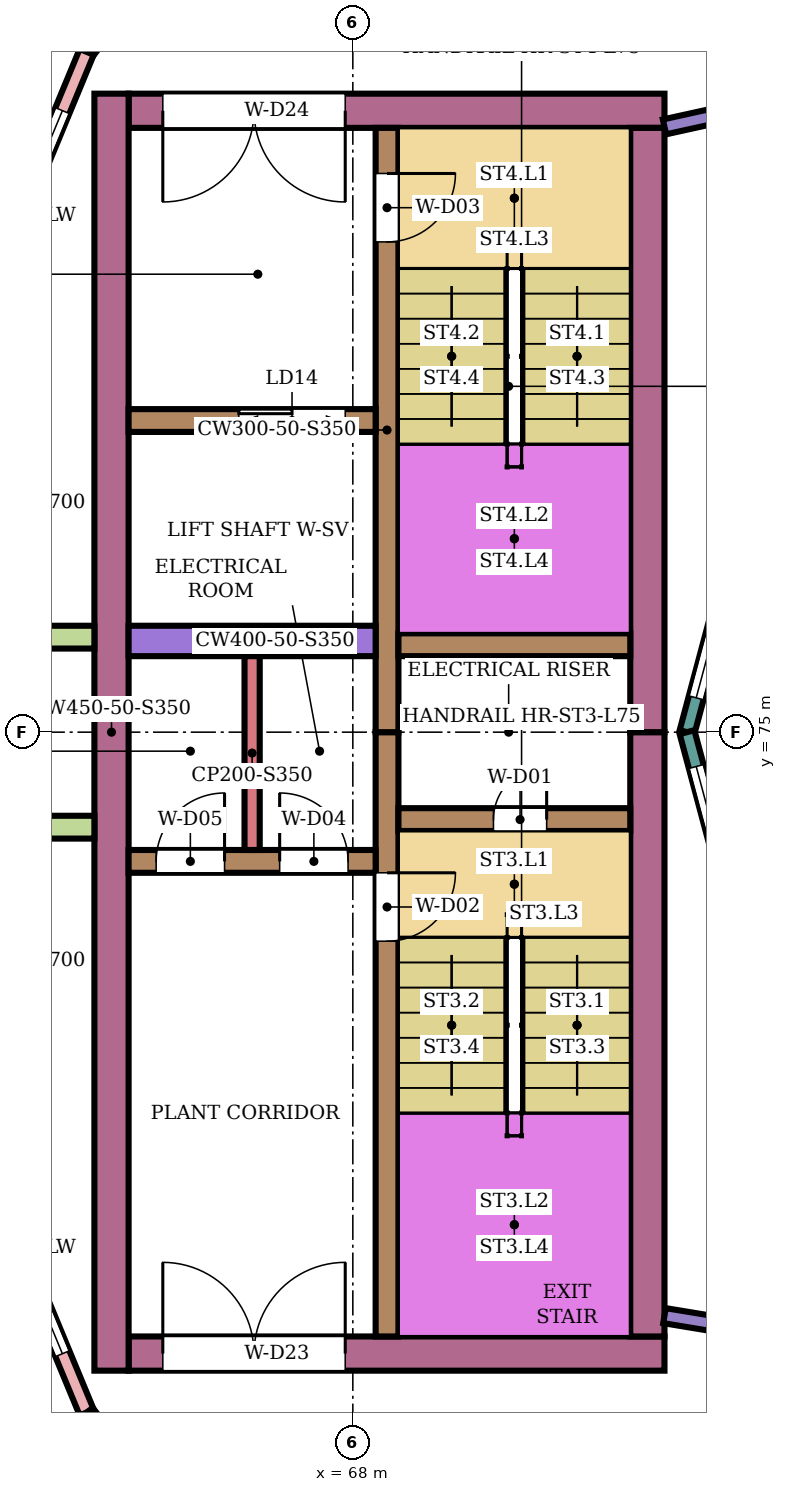
"""IFC4 building model, lengths in metres.
Left out: names, types, materials, properties, quantities, classifications, styles, units other than length and angle.
Written with IfcOpenShell. Run it as: python <this file> out.ifc"""

import sys

from ifc_helpers import new_model, si_unit, direction, frame, frame_2d, origin, place, context, subcontext, project, spatial, rectangle, extrude, element, fill, save


model = new_model("IFC4")
c1 = context("Model", 3, precision=1e-05, world=origin(), true_north=direction((0.0, 1.0)))
c2 = subcontext(c1, "Body", "Model", "MODEL_VIEW")
j1 = project(units=[si_unit("LENGTHUNIT", "METRE"), si_unit("PLANEANGLEUNIT", "RADIAN")], contexts=[c1])
p1 = place(None, origin())
s1 = spatial("IfcSite", under=j1, at=p1, CompositionType="ELEMENT")
p2 = place(p1, origin())
s2 = spatial("IfcBuilding", under=s1, at=p2, CompositionType="ELEMENT")
p3 = place(p2, frame((0.0, 0.0, 328.1)))
s3 = spatial("IfcBuildingStorey", under=s2, at=p3, CompositionType="ELEMENT", Elevation=328.1)
p4 = place(p3, frame((72.1, 66.825, 0.0), z_axis=(0.0, 0.0, 1.0), x_axis=(-1.0, 0.0, 0.0)))
e1 = element("IfcWall", 1, at=p4, inside=s3, PredefinedType="SHEAR", context=c2, shape_type="SweptSolid", body=[
    extrude(rectangle(XDim=7.05, YDim=0.45, at=frame_2d((3.525, 0.0))), origin(), (0.0, 0.0, 1.0), 4.65),
])
p5 = place(p4, frame((4.2, 0.0, 0.0)))
e2 = element("IfcOpeningElement", 2, at=p5, cuts=e1, PredefinedType="OPENING", context=c2, shape_type="SweptSolid", body=[
    extrude(rectangle(XDim=2.4, YDim=2.4, at=frame_2d((1.2, 1.2))), frame((0.0, 0.235, 0.0), z_axis=(0.0, -1.0, 0.0), x_axis=(1.0, 0.0, 0.0)), (0.0, 0.0, 1.0), 0.47),
])
p6 = place(p3, frame((72.1, 83.175, 0.0), z_axis=(0.0, 0.0, 1.0), x_axis=(-1.0, 0.0, 0.0)))
e3 = element("IfcWall", 3, at=p6, inside=s3, PredefinedType="SHEAR", context=c2, shape_type="SweptSolid", body=[
    extrude(rectangle(XDim=7.05, YDim=0.45, at=frame_2d((3.525, 0.0))), origin(), (0.0, 0.0, 1.0), 4.65),
])
p7 = place(p6, frame((4.2, 0.0, 0.0)))
e4 = element("IfcOpeningElement", 4, at=p7, cuts=e3, PredefinedType="OPENING", context=c2, shape_type="SweptSolid", body=[
    extrude(rectangle(XDim=2.4, YDim=2.4, at=frame_2d((1.2, 1.2))), frame((0.0, 0.235, 0.0), z_axis=(0.0, -1.0, 0.0), x_axis=(1.0, 0.0, 0.0)), (0.0, 0.0, 1.0), 0.47),
])
for number, where, z_axis, x_axis in (
    (5, (71.875, 75.0, 0.0), (0.0, 0.0, 1.0), (0.0, -1.0, 0.0)),
    (6, (71.875, 82.95, 0.0), (0.0, 0.0, 1.0), (0.0, -1.0, 0.0)),
):
    element("IfcWall", number, at=place(p3, frame(where, z_axis=z_axis, x_axis=x_axis)), inside=s3, PredefinedType="SHEAR", context=c2, shape_type="SweptSolid", body=[
        extrude(rectangle(XDim=7.95, YDim=0.45, at=frame_2d((3.975, 0.0))), origin(), (0.0, 0.0, 1.0), 4.65),
    ])
p8 = place(p3, frame((64.825, 83.4, 0.0), z_axis=(0.0, 0.0, 1.0), x_axis=(0.0, -1.0, 0.0)))
e7 = element("IfcWall", 7, at=p8, inside=s3, PredefinedType="SHEAR", context=c2, shape_type="SweptSolid", body=[
    extrude(rectangle(XDim=16.8, YDim=0.45, at=frame_2d((8.4, 0.0))), origin(), (0.0, 0.0, 1.0), 4.65),
])
p9 = place(p3, frame((68.45, 75.0, 0.0), z_axis=(0.0, 0.0, 1.0), x_axis=(0.0, -1.0, 0.0)))
e8 = element("IfcWall", 8, at=p9, inside=s3, PredefinedType="SHEAR", context=c2, shape_type="SweptSolid", body=[
    extrude(rectangle(XDim=7.95, YDim=0.3, at=frame_2d((3.975, 0.0))), origin(), (0.0, 0.0, 1.0), 4.65),
])
p10 = place(p9, frame((1.85, 0.0, 0.0)))
e9 = element("IfcOpeningElement", 9, at=p10, cuts=e8, PredefinedType="OPENING", context=c2, shape_type="SweptSolid", body=[
    extrude(rectangle(XDim=0.9, YDim=2.1, at=frame_2d((0.45, 1.05))), frame((0.0, 0.16, 0.0), z_axis=(0.0, -1.0, 0.0), x_axis=(1.0, 0.0, 0.0)), (0.0, 0.0, 1.0), 0.32),
])
p11 = place(p3, frame((68.45, 82.95, 0.0), z_axis=(0.0, 0.0, 1.0), x_axis=(0.0, -1.0, 0.0)))
e10 = element("IfcWall", 10, at=p11, inside=s3, PredefinedType="SHEAR", context=c2, shape_type="SweptSolid", body=[
    extrude(rectangle(XDim=7.95, YDim=0.3, at=frame_2d((3.975, 0.0))), origin(), (0.0, 0.0, 1.0), 4.65),
])
p12 = place(p11, frame((0.6, 0.0, 0.0)))
e11 = element("IfcOpeningElement", 11, at=p12, cuts=e10, PredefinedType="OPENING", context=c2, shape_type="SweptSolid", body=[
    extrude(rectangle(XDim=0.9, YDim=2.1, at=frame_2d((0.45, 1.05))), frame((0.0, 0.16, 0.0), z_axis=(0.0, -1.0, 0.0), x_axis=(1.0, 0.0, 0.0)), (0.0, 0.0, 1.0), 0.32),
])
p13 = place(p3, frame((71.65, 73.85, 0.0), z_axis=(0.0, 0.0, 1.0), x_axis=(-1.0, 0.0, 0.0)))
e12 = element("IfcWall", 12, at=p13, inside=s3, PredefinedType="SHEAR", context=c2, shape_type="SweptSolid", body=[
    extrude(rectangle(XDim=3.05, YDim=0.3, at=frame_2d((1.525, 0.0))), origin(), (0.0, 0.0, 1.0), 4.65),
])
p14 = place(p13, frame((1.1, 0.0, 0.0)))
e13 = element("IfcOpeningElement", 13, at=p14, cuts=e12, PredefinedType="OPENING", context=c2, shape_type="SweptSolid", body=[
    extrude(rectangle(XDim=0.7, YDim=2.0, at=frame_2d((0.35, 1.0))), frame((0.0, 0.16, 0.0), z_axis=(0.0, -1.0, 0.0), x_axis=(1.0, 0.0, 0.0)), (0.0, 0.0, 1.0), 0.32),
])
p15 = place(p3, frame((71.65, 76.15, 0.0), z_axis=(0.0, 0.0, 1.0), x_axis=(-1.0, 0.0, 0.0)))
e14 = element("IfcWall", 14, at=p15, inside=s3, PredefinedType="SHEAR", context=c2, shape_type="SweptSolid", body=[
    extrude(rectangle(XDim=3.05, YDim=0.3, at=frame_2d((1.525, 0.0))), origin(), (0.0, 0.0, 1.0), 4.65),
])
p16 = place(p3, frame((68.3, 73.3, 0.0), z_axis=(0.0, 0.0, 1.0), x_axis=(-1.0, 0.0, 0.0)))
e15 = element("IfcWall", 15, at=p16, inside=s3, PredefinedType="SHEAR", context=c2, shape_type="SweptSolid", body=[
    extrude(rectangle(XDim=3.25, YDim=0.3, at=frame_2d((1.625, 0.0))), origin(), (0.0, 0.0, 1.0), 4.65),
])
p17 = place(p16, frame((0.363, 0.0, 0.0)))
e16 = element("IfcOpeningElement", 16, at=p17, cuts=e15, PredefinedType="OPENING", context=c2, shape_type="SweptSolid", body=[
    extrude(rectangle(XDim=0.9, YDim=2.1, at=frame_2d((0.45, 1.05))), frame((0.0, 0.16, 0.0), z_axis=(0.0, -1.0, 0.0), x_axis=(1.0, 0.0, 0.0)), (0.0, 0.0, 1.0), 0.32),
])
p18 = place(p16, frame((1.988, 0.0, 0.0)))
e17 = element("IfcOpeningElement", 17, at=p18, cuts=e15, PredefinedType="OPENING", context=c2, shape_type="SweptSolid", body=[
    extrude(rectangle(XDim=0.9, YDim=2.1, at=frame_2d((0.45, 1.05))), frame((0.0, 0.16, 0.0), z_axis=(0.0, -1.0, 0.0), x_axis=(1.0, 0.0, 0.0)), (0.0, 0.0, 1.0), 0.32),
])
p19 = place(p3, frame((68.3, 76.2, 0.0), z_axis=(0.0, 0.0, 1.0), x_axis=(-1.0, 0.0, 0.0)))
e18 = element("IfcWall", 18, at=p19, inside=s3, PredefinedType="SHEAR", context=c2, shape_type="SweptSolid", body=[
    extrude(rectangle(XDim=3.25, YDim=0.4, at=frame_2d((1.625, 0.0))), origin(), (0.0, 0.0, 1.0), 4.65),
])
p20 = place(p3, frame((68.3, 79.1, 0.0), z_axis=(0.0, 0.0, 1.0), x_axis=(-1.0, 0.0, 0.0)))
e19 = element("IfcWall", 19, at=p20, inside=s3, PredefinedType="SHEAR", context=c2, shape_type="SweptSolid", body=[
    extrude(rectangle(XDim=3.25, YDim=0.3, at=frame_2d((1.625, 0.0))), origin(), (0.0, 0.0, 1.0), 4.65),
])
p21 = place(p20, frame((0.4, 0.0, 0.0)))
e20 = element("IfcOpeningElement", 20, at=p21, cuts=e19, PredefinedType="OPENING", context=c2, shape_type="SweptSolid", body=[
    extrude(rectangle(XDim=1.4, YDim=2.1, at=frame_2d((0.7, 1.05))), frame((0.0, 0.16, 0.0), z_axis=(0.0, -1.0, 0.0), x_axis=(1.0, 0.0, 0.0)), (0.0, 0.0, 1.0), 0.32),
])
p22 = place(p3, frame((66.484, 86.536, 0.0), z_axis=(0.0, 0.0, 1.0), x_axis=(-0.608780431243, -0.793338759003, 0.0)))
e21 = element("IfcWall", 21, at=p22, inside=s3, PredefinedType="NOTDEFINED", context=c2, shape_type="SweptSolid", body=[
    extrude(rectangle(XDim=3.261, YDim=0.2, at=frame_2d((1.63, 0.0))), origin(), (0.0, 0.0, 1.0), 5.0),
])
p23 = place(p22, frame((0.83, 0.0, 0.5)))
e22 = element("IfcOpeningElement", 22, at=p23, cuts=e21, PredefinedType="OPENING", context=c2, shape_type="SweptSolid", body=[
    extrude(rectangle(XDim=1.6, YDim=3.7, at=frame_2d((0.8, 1.85))), frame((0.0, 0.11, 0.0), z_axis=(0.0, -1.0, 0.0), x_axis=(1.0, 0.0, 0.0)), (0.0, 0.0, 1.0), 0.22),
])
p24 = place(p3, frame((64.499, 83.949, 0.0), z_axis=(0.0, 0.0, 1.0), x_axis=(-0.382677892842, -0.923881827038, 0.0)))
e23 = element("IfcWall", 23, at=p24, inside=s3, PredefinedType="NOTDEFINED", context=c2, shape_type="SweptSolid", body=[
    extrude(rectangle(XDim=4.673, YDim=0.2, at=frame_2d((2.336, 0.0))), origin(), (0.0, 0.0, 1.0), 5.0),
])
p25 = place(p24, frame((0.836, 0.0, 0.5)))
e24 = element("IfcOpeningElement", 24, at=p25, cuts=e23, PredefinedType="OPENING", context=c2, shape_type="SweptSolid", body=[
    extrude(rectangle(XDim=3.0, YDim=3.7, at=frame_2d((1.5, 1.85))), frame((0.0, 0.11, 0.0), z_axis=(0.0, -1.0, 0.0), x_axis=(1.0, 0.0, 0.0)), (0.0, 0.0, 1.0), 0.22),
])
p26 = place(p3, frame((62.711, 70.367, 0.0), z_axis=(0.0, 0.0, 1.0), x_axis=(0.382677892842, -0.923881827038, 0.0)))
e25 = element("IfcWall", 25, at=p26, inside=s3, PredefinedType="NOTDEFINED", context=c2, shape_type="SweptSolid", body=[
    extrude(rectangle(XDim=4.673, YDim=0.2, at=frame_2d((2.336, 0.0))), origin(), (0.0, 0.0, 1.0), 5.0),
])
p27 = place(p26, frame((0.836, 0.0, 0.5)))
e26 = element("IfcOpeningElement", 26, at=p27, cuts=e25, PredefinedType="OPENING", context=c2, shape_type="SweptSolid", body=[
    extrude(rectangle(XDim=3.0, YDim=3.7, at=frame_2d((1.5, 1.85))), frame((0.0, 0.11, 0.0), z_axis=(0.0, -1.0, 0.0), x_axis=(1.0, 0.0, 0.0)), (0.0, 0.0, 1.0), 0.22),
])
p28 = place(p3, frame((64.499, 66.051, 0.0), z_axis=(0.0, 0.0, 1.0), x_axis=(0.608780431243, -0.793338759003, 0.0)))
e27 = element("IfcWall", 27, at=p28, inside=s3, PredefinedType="NOTDEFINED", context=c2, shape_type="SweptSolid", body=[
    extrude(rectangle(XDim=3.261, YDim=0.2, at=frame_2d((1.63, 0.0))), origin(), (0.0, 0.0, 1.0), 5.0),
])
p29 = place(p28, frame((0.83, 0.0, 0.5)))
e28 = element("IfcOpeningElement", 28, at=p29, cuts=e27, PredefinedType="OPENING", context=c2, shape_type="SweptSolid", body=[
    extrude(rectangle(XDim=1.6, YDim=3.7, at=frame_2d((0.8, 1.85))), frame((0.0, 0.11, 0.0), z_axis=(0.0, -1.0, 0.0), x_axis=(1.0, 0.0, 0.0)), (0.0, 0.0, 1.0), 0.22),
])
for number, where, z_axis, x_axis in (
    (29, (64.6, 76.25, 0.0), (0.0, 0.0, 1.0), (-1.0, 0.0, 0.0)),
    (30, (64.6, 73.75, 0.0), (0.0, 0.0, 1.0), (-1.0, 0.0, 0.0)),
):
    element("IfcWall", number, at=place(p3, frame(where, z_axis=z_axis, x_axis=x_axis)), inside=s3, PredefinedType="NOTDEFINED", context=c2, shape_type="SweptSolid", body=[
        extrude(rectangle(XDim=2.416, YDim=0.3, at=frame_2d((1.208, 0.0))), origin(), (0.0, 0.0, 1.0), 5.0),
    ])
p30 = place(p3, frame((73.415, 78.802, 0.0), z_axis=(0.0, 0.0, 1.0), x_axis=(-0.258789828301, -0.965933654434, 0.0)))
e31 = element("IfcWall", 31, at=p30, inside=s3, PredefinedType="NOTDEFINED", context=c2, shape_type="SweptSolid", body=[
    extrude(rectangle(XDim=3.936, YDim=0.2, at=frame_2d((1.968, 0.0))), origin(), (0.0, 0.0, 1.0), 5.0),
])
p31 = place(p30, frame((0.468, 0.0, 0.9)))
e32 = element("IfcOpeningElement", 32, at=p31, cuts=e31, PredefinedType="OPENING", context=c2, shape_type="SweptSolid", body=[
    extrude(rectangle(XDim=3.0, YDim=2.3, at=frame_2d((1.5, 1.15))), frame((0.0, 0.11, 0.0), z_axis=(0.0, -1.0, 0.0), x_axis=(1.0, 0.0, 0.0)), (0.0, 0.0, 1.0), 0.22),
])
p32 = place(p3, frame((72.396, 75.0, 0.0), z_axis=(0.0, 0.0, 1.0), x_axis=(0.258789828301, -0.965933654434, 0.0)))
e33 = element("IfcWall", 33, at=p32, inside=s3, PredefinedType="NOTDEFINED", context=c2, shape_type="SweptSolid", body=[
    extrude(rectangle(XDim=3.936, YDim=0.2, at=frame_2d((1.968, 0.0))), origin(), (0.0, 0.0, 1.0), 5.0),
])
p33 = place(p32, frame((0.468, 0.0, 0.9)))
e34 = element("IfcOpeningElement", 34, at=p33, cuts=e33, PredefinedType="OPENING", context=c2, shape_type="SweptSolid", body=[
    extrude(rectangle(XDim=3.0, YDim=2.3, at=frame_2d((1.5, 1.15))), frame((0.0, 0.11, 0.0), z_axis=(0.0, -1.0, 0.0), x_axis=(1.0, 0.0, 0.0)), (0.0, 0.0, 1.0), 0.22),
])
p34 = place(p3, frame((72.1, 67.324, 0.0), z_axis=(0.0, 0.0, 1.0), x_axis=(0.986637344471, -0.16293173569, 0.0)))
e35 = element("IfcWall", 35, at=p34, inside=s3, PredefinedType="PARTITIONING", context=c2, shape_type="SweptSolid", body=[
    extrude(rectangle(XDim=2.807, YDim=0.2, at=frame_2d((1.403, 0.0))), origin(), (0.0, 0.0, 1.0), 4.55),
])
p35 = place(p34, frame((0.808, 0.0, 0.0)))
e36 = element("IfcOpeningElement", 36, at=p35, cuts=e35, PredefinedType="OPENING", context=c2, shape_type="SweptSolid", body=[
    extrude(rectangle(XDim=1.2, YDim=2.4, at=frame_2d((0.6, 1.2))), frame((0.0, 0.11, 0.0), z_axis=(0.0, -1.0, 0.0), x_axis=(1.0, 0.0, 0.0)), (0.0, 0.0, 1.0), 0.22),
])
p36 = place(p3, frame((72.1, 82.963, 0.0), z_axis=(0.0, 0.0, 1.0), x_axis=(0.976538663429, 0.215342143642, 0.0)))
e37 = element("IfcWall", 37, at=p36, inside=s3, PredefinedType="PARTITIONING", context=c2, shape_type="SweptSolid", body=[
    extrude(rectangle(XDim=2.637, YDim=0.2, at=frame_2d((1.318, 0.0))), origin(), (0.0, 0.0, 1.0), 4.55),
])
p37 = place(p36, frame((0.723, 0.0, 0.0)))
e38 = element("IfcOpeningElement", 38, at=p37, cuts=e37, PredefinedType="OPENING", context=c2, shape_type="SweptSolid", body=[
    extrude(rectangle(XDim=1.2, YDim=2.4, at=frame_2d((0.6, 1.2))), frame((0.0, 0.11, 0.0), z_axis=(0.0, -1.0, 0.0), x_axis=(1.0, 0.0, 0.0)), (0.0, 0.0, 1.0), 0.22),
])
p38 = place(p3, frame((66.675, 76.0, 0.0), z_axis=(0.0, 0.0, 1.0), x_axis=(0.0, -1.0, 0.0)))
e39 = element("IfcWall", 39, at=p38, inside=s3, PredefinedType="PARTITIONING", context=c2, shape_type="SweptSolid", body=[
    extrude(rectangle(XDim=2.55, YDim=0.2, at=frame_2d((1.275, 0.0))), origin(), (0.0, 0.0, 1.0), 4.65),
])
p39 = place(p25, origin())
e40 = element("IfcWindow", 40, at=p39, inside=s3, PartitioningType="SINGLE_PANEL", PredefinedType="USERDEFINED", context=c2, shape_type="SweptSolid", body=[
    extrude(rectangle(XDim=3.0, YDim=3.7, at=frame_2d((1.5, 1.85))), frame((0.0, 0.03, 0.0), z_axis=(0.0, -1.0, 0.0), x_axis=(1.0, 0.0, 0.0)), (0.0, 0.0, 1.0), 0.06),
])
fill(e24, e40)
p40 = place(p27, origin())
e41 = element("IfcWindow", 41, at=p40, inside=s3, PartitioningType="SINGLE_PANEL", PredefinedType="USERDEFINED", context=c2, shape_type="SweptSolid", body=[
    extrude(rectangle(XDim=3.0, YDim=3.7, at=frame_2d((1.5, 1.85))), frame((0.0, 0.03, 0.0), z_axis=(0.0, -1.0, 0.0), x_axis=(1.0, 0.0, 0.0)), (0.0, 0.0, 1.0), 0.06),
])
fill(e26, e41)
p41 = place(p31, origin())
e42 = element("IfcWindow", 42, at=p41, inside=s3, PartitioningType="SINGLE_PANEL", PredefinedType="WINDOW", context=c2, shape_type="SweptSolid", body=[
    extrude(rectangle(XDim=3.0, YDim=2.3, at=frame_2d((1.5, 1.15))), frame((0.0, 0.03, 0.0), z_axis=(0.0, -1.0, 0.0), x_axis=(1.0, 0.0, 0.0)), (0.0, 0.0, 1.0), 0.06),
])
fill(e32, e42)
p42 = place(p33, origin())
e43 = element("IfcWindow", 43, at=p42, inside=s3, PartitioningType="SINGLE_PANEL", PredefinedType="WINDOW", context=c2, shape_type="SweptSolid", body=[
    extrude(rectangle(XDim=3.0, YDim=2.3, at=frame_2d((1.5, 1.15))), frame((0.0, 0.03, 0.0), z_axis=(0.0, -1.0, 0.0), x_axis=(1.0, 0.0, 0.0)), (0.0, 0.0, 1.0), 0.06),
])
fill(e34, e43)
p43 = place(p14, frame((0.7, 0.0, 0.0), z_axis=(0.0, 0.0, 1.0), x_axis=(-1.0, 0.0, 0.0)))
e44 = element("IfcDoor", 44, at=p43, inside=s3, OperationType="SINGLE_SWING_RIGHT", PredefinedType="DOOR", context=c2, shape_type="SweptSolid", body=[
    extrude(rectangle(XDim=0.7, YDim=2.0, at=frame_2d((0.35, 1.0))), frame((0.0, 0.025, 0.0), z_axis=(0.0, -1.0, 0.0), x_axis=(1.0, 0.0, 0.0)), (0.0, 0.0, 1.0), 0.05),
])
fill(e13, e44)
p44 = place(p10, origin())
e45 = element("IfcDoor", 45, at=p44, inside=s3, OperationType="SINGLE_SWING_LEFT", PredefinedType="DOOR", context=c2, shape_type="SweptSolid", body=[
    extrude(rectangle(XDim=0.9, YDim=2.1, at=frame_2d((0.45, 1.05))), frame((0.0, 0.025, 0.0), z_axis=(0.0, -1.0, 0.0), x_axis=(1.0, 0.0, 0.0)), (0.0, 0.0, 1.0), 0.05),
])
fill(e9, e45)
p45 = place(p12, origin())
e46 = element("IfcDoor", 46, at=p45, inside=s3, OperationType="SINGLE_SWING_LEFT", PredefinedType="DOOR", context=c2, shape_type="SweptSolid", body=[
    extrude(rectangle(XDim=0.9, YDim=2.1, at=frame_2d((0.45, 1.05))), frame((0.0, 0.025, 0.0), z_axis=(0.0, -1.0, 0.0), x_axis=(1.0, 0.0, 0.0)), (0.0, 0.0, 1.0), 0.05),
])
fill(e11, e46)
p46 = place(p17, frame((0.9, 0.0, 0.0), z_axis=(0.0, 0.0, 1.0), x_axis=(-1.0, 0.0, 0.0)))
e47 = element("IfcDoor", 47, at=p46, inside=s3, OperationType="SINGLE_SWING_LEFT", PredefinedType="DOOR", context=c2, shape_type="SweptSolid", body=[
    extrude(rectangle(XDim=0.9, YDim=2.1, at=frame_2d((0.45, 1.05))), frame((0.0, 0.025, 0.0), z_axis=(0.0, -1.0, 0.0), x_axis=(1.0, 0.0, 0.0)), (0.0, 0.0, 1.0), 0.05),
])
fill(e16, e47)
p47 = place(p18, frame((0.9, 0.0, 0.0), z_axis=(0.0, 0.0, 1.0), x_axis=(-1.0, 0.0, 0.0)))
e48 = element("IfcDoor", 48, at=p47, inside=s3, OperationType="SINGLE_SWING_RIGHT", PredefinedType="DOOR", context=c2, shape_type="SweptSolid", body=[
    extrude(rectangle(XDim=0.9, YDim=2.1, at=frame_2d((0.45, 1.05))), frame((0.0, 0.025, 0.0), z_axis=(0.0, -1.0, 0.0), x_axis=(1.0, 0.0, 0.0)), (0.0, 0.0, 1.0), 0.05),
])
fill(e17, e48)
p48 = place(p21, origin())
e49 = element("IfcDoor", 49, at=p48, inside=s3, OperationType="DOUBLE_DOOR_SLIDING", PredefinedType="DOOR", context=c2, shape_type="SweptSolid", body=[
    extrude(rectangle(XDim=1.4, YDim=2.1, at=frame_2d((0.7, 1.05))), frame((0.0, 0.025, 0.0), z_axis=(0.0, -1.0, 0.0), x_axis=(1.0, 0.0, 0.0)), (0.0, 0.0, 1.0), 0.05),
])
fill(e20, e49)
p49 = place(p5, frame((2.4, 0.0, 0.0), z_axis=(0.0, 0.0, 1.0), x_axis=(-1.0, 0.0, 0.0)))
e50 = element("IfcDoor", 50, at=p49, inside=s3, OperationType="DOUBLE_DOOR_SINGLE_SWING", PredefinedType="DOOR", context=c2, shape_type="SweptSolid", body=[
    extrude(rectangle(XDim=2.4, YDim=2.4, at=frame_2d((1.2, 1.2))), frame((0.0, 0.025, 0.0), z_axis=(0.0, -1.0, 0.0), x_axis=(1.0, 0.0, 0.0)), (0.0, 0.0, 1.0), 0.05),
])
fill(e2, e50)
p50 = place(p7, origin())
e51 = element("IfcDoor", 51, at=p50, inside=s3, OperationType="DOUBLE_DOOR_SINGLE_SWING", PredefinedType="DOOR", context=c2, shape_type="SweptSolid", body=[
    extrude(rectangle(XDim=2.4, YDim=2.4, at=frame_2d((1.2, 1.2))), frame((0.0, 0.025, 0.0), z_axis=(0.0, -1.0, 0.0), x_axis=(1.0, 0.0, 0.0)), (0.0, 0.0, 1.0), 0.05),
])
fill(e4, e51)
save(model, sys.argv[1])
